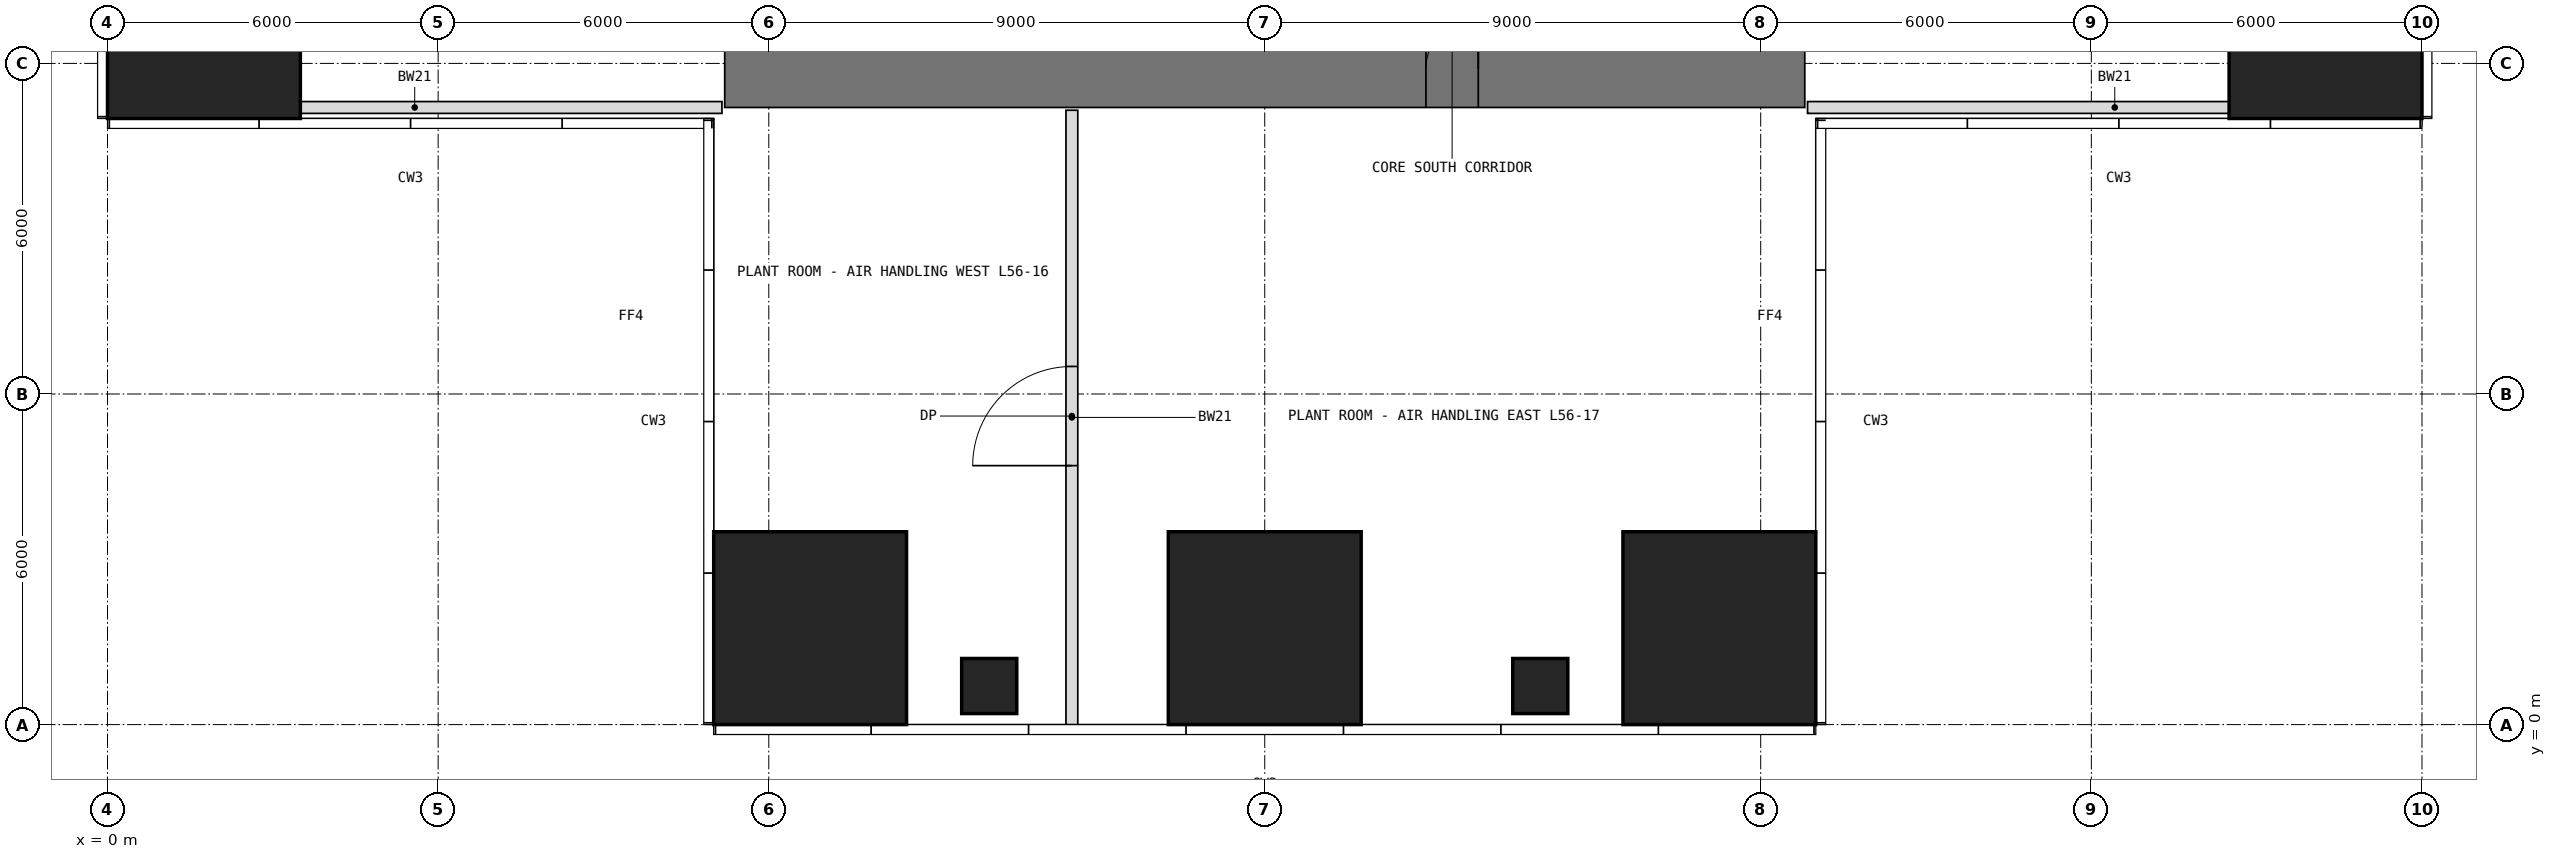
"""IFC4 building model, lengths in metres.
Left out: names, types, materials, properties, quantities, classifications, styles, units other than length and angle.
Written with IfcOpenShell. Run it as: python <this file> out.ifc"""

import sys

from ifc_helpers import new_model, si_unit, direction, frame, frame_2d, origin, origin_2d, place, context, subcontext, project, spatial, rectangle, extrude, element, fill, save


model = new_model("IFC4")
c1 = context("Model", 3, precision=1e-05, world=origin(), true_north=direction((0.0, 1.0)))
c2 = subcontext(c1, "Body", "Model", "MODEL_VIEW")
j1 = project(units=[si_unit("LENGTHUNIT", "METRE"), si_unit("PLANEANGLEUNIT", "RADIAN")], contexts=[c1])
p1 = place(None, origin())
s1 = spatial("IfcSite", under=j1, at=p1, CompositionType="ELEMENT")
p2 = place(p1, origin())
s2 = spatial("IfcBuilding", under=s1, at=p2, CompositionType="ELEMENT")
p3 = place(p2, frame((0.0, 0.0, 234.5)))
s3 = spatial("IfcBuildingStorey", under=s2, at=p3, CompositionType="ELEMENT", Elevation=234.5)
p4 = place(p3, frame((12.75, 1.75, 0.0), z_axis=(0.0, 0.0, 1.0), x_axis=(1.0, 0.0, 0.0)))
e1 = element("IfcColumn", 1, at=p4, inside=s3, PredefinedType="COLUMN", context=c2, shape_type="SweptSolid", body=[
    extrude(rectangle(XDim=3.5, YDim=3.5, at=origin_2d()), origin(), (0.0, 0.0, 1.0), 5.0),
])
p5 = place(p3, frame((16.0, 0.7, 0.0), z_axis=(0.0, 0.0, 1.0), x_axis=(1.0, 0.0, 0.0)))
e2 = element("IfcColumn", 2, at=p5, inside=s3, PredefinedType="COLUMN", context=c2, shape_type="SweptSolid", body=[
    extrude(rectangle(XDim=1.0, YDim=1.0, at=origin_2d()), origin(), (0.0, 0.0, 1.0), 5.0),
])
p6 = place(p3, frame((21.0, 1.75, 0.0), z_axis=(0.0, 0.0, 1.0), x_axis=(1.0, 0.0, 0.0)))
e3 = element("IfcColumn", 3, at=p6, inside=s3, PredefinedType="COLUMN", context=c2, shape_type="SweptSolid", body=[
    extrude(rectangle(XDim=3.5, YDim=3.5, at=origin_2d()), origin(), (0.0, 0.0, 1.0), 5.0),
])
p7 = place(p3, frame((26.0, 0.7, 0.0), z_axis=(0.0, 0.0, 1.0), x_axis=(1.0, 0.0, 0.0)))
e4 = element("IfcColumn", 4, at=p7, inside=s3, PredefinedType="COLUMN", context=c2, shape_type="SweptSolid", body=[
    extrude(rectangle(XDim=1.0, YDim=1.0, at=origin_2d()), origin(), (0.0, 0.0, 1.0), 5.0),
])
for number, where, z_axis, x_axis in (
    (5, (29.25, 1.75, 0.0), (0.0, 0.0, 1.0), (1.0, 0.0, 0.0)),
    (6, (1.75, 12.75, 0.0), (0.0, 0.0, 1.0), (1.0, 0.0, 0.0)),
    (7, (40.25, 12.75, 0.0), (0.0, 0.0, 1.0), (1.0, 0.0, 0.0)),
):
    element("IfcColumn", number, at=place(p3, frame(where, z_axis=z_axis, x_axis=x_axis)), inside=s3, PredefinedType="COLUMN", context=c2, shape_type="SweptSolid", body=[
        extrude(rectangle(XDim=3.5, YDim=3.5, at=origin_2d()), origin(), (0.0, 0.0, 1.0), 5.0),
    ])
p8 = place(p3, frame((11.2, 11.9, -0.25), z_axis=(0.0, 0.0, 1.0), x_axis=(1.0, 0.0, 0.0)))
e8 = element("IfcWall", 8, at=p8, inside=s3, PredefinedType="SHEAR", context=c2, shape_type="SweptSolid", body=[
    extrude(rectangle(XDim=19.6, YDim=1.4, at=frame_2d((9.8, 0.0))), origin(), (0.0, 0.0, 1.0), 5.2),
])
p9 = place(p8, frame((12.725, 0.0, 0.25)))
e9 = element("IfcOpeningElement", 9, at=p9, cuts=e8, PredefinedType="OPENING", context=c2, shape_type="SweptSolid", body=[
    extrude(rectangle(XDim=0.95, YDim=2.4, at=frame_2d((0.475, 1.2))), frame((0.0, 0.71, 0.0), z_axis=(0.0, -1.0, 0.0), x_axis=(1.0, 0.0, 0.0)), (0.0, 0.0, 1.0), 1.42),
])
p10 = place(p3, frame((0.0, 11.2, 0.0), z_axis=(0.0, 0.0, 1.0), x_axis=(1.0, 0.0, 0.0)))
e10 = element("IfcWall", 10, at=p10, inside=s3, PredefinedType="PARTITIONING", context=c2, shape_type="SweptSolid", body=[
    extrude(rectangle(XDim=11.15, YDim=0.215, at=frame_2d((5.575, 0.0))), origin(), (0.0, 0.0, 1.0), 4.75),
])
p11 = place(p3, frame((17.5, 0.0, 0.0), z_axis=(0.0, 0.0, 1.0), x_axis=(0.0, 1.0, 0.0)))
e11 = element("IfcWall", 11, at=p11, inside=s3, PredefinedType="PARTITIONING", context=c2, shape_type="SweptSolid", body=[
    extrude(rectangle(XDim=11.15, YDim=0.215, at=frame_2d((5.575, 0.0))), origin(), (0.0, 0.0, 1.0), 4.75),
])
p12 = place(p11, frame((4.7, 0.0, 0.0)))
e12 = element("IfcOpeningElement", 12, at=p12, cuts=e11, PredefinedType="OPENING", context=c2, shape_type="SweptSolid", body=[
    extrude(rectangle(XDim=1.8, YDim=2.4, at=frame_2d((0.9, 1.2))), frame((0.0, 0.118, 0.0), z_axis=(0.0, -1.0, 0.0), x_axis=(1.0, 0.0, 0.0)), (0.0, 0.0, 1.0), 0.235),
])
p13 = place(p3, frame((30.85, 11.2, 0.0), z_axis=(0.0, 0.0, 1.0), x_axis=(1.0, 0.0, 0.0)))
e13 = element("IfcWall", 13, at=p13, inside=s3, PredefinedType="PARTITIONING", context=c2, shape_type="SweptSolid", body=[
    extrude(rectangle(XDim=11.15, YDim=0.215, at=frame_2d((5.575, 0.0))), origin(), (0.0, 0.0, 1.0), 4.75),
])
p14 = place(p9, origin())
e14 = element("IfcDoor", 14, at=p14, inside=s3, OperationType="SINGLE_SWING_RIGHT", PredefinedType="DOOR", context=c2, shape_type="SweptSolid", body=[
    extrude(rectangle(XDim=0.95, YDim=2.4, at=frame_2d((0.475, 1.2))), frame((0.0, -0.175, 0.0), z_axis=(0.0, -1.0, 0.0), x_axis=(1.0, 0.0, 0.0)), (0.0, 0.0, 1.0), 0.05),
])
fill(e9, e14)
p15 = place(p12, origin())
e15 = element("IfcDoor", 15, at=p15, inside=s3, OperationType="DOUBLE_DOOR_SINGLE_SWING", PredefinedType="DOOR", context=c2, shape_type="SweptSolid", body=[
    extrude(rectangle(XDim=1.8, YDim=2.4, at=frame_2d((0.9, 1.2))), frame((0.0, 0.025, 0.0), z_axis=(0.0, -1.0, 0.0), x_axis=(1.0, 0.0, 0.0)), (0.0, 0.0, 1.0), 0.05),
])
fill(e12, e15)
save(model, sys.argv[1])
